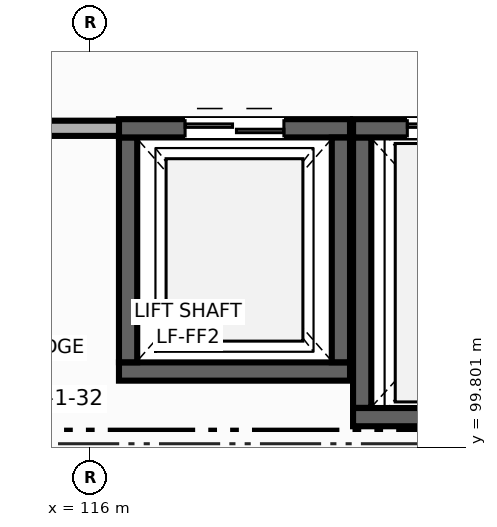
"""IFC4 building model, lengths in metres.
Left out: names, types, materials, properties, quantities, classifications, styles, units other than length and angle.
Written with IfcOpenShell. Run it as: python <this file> out.ifc"""

import sys

from ifc_helpers import new_model, si_unit, direction, frame, frame_2d, origin, place, context, subcontext, project, spatial, rectangle, extrude, element, fill, save


model = new_model("IFC4")
c1 = context("Model", 3, precision=1e-05, world=origin(), true_north=direction((0.0, 1.0)))
c2 = subcontext(c1, "Body", "Model", "MODEL_VIEW")
j1 = project(units=[si_unit("LENGTHUNIT", "METRE"), si_unit("PLANEANGLEUNIT", "RADIAN")], contexts=[c1])
p1 = place(None, origin())
s1 = spatial("IfcSite", under=j1, at=p1, CompositionType="ELEMENT")
p2 = place(p1, origin())
s2 = spatial("IfcBuilding", under=s1, at=p2, CompositionType="ELEMENT")
p3 = place(p2, frame((0.0, 0.0, 18.9)))
s3 = spatial("IfcBuildingStorey", under=s2, at=p3, CompositionType="ELEMENT", Elevation=18.9)
p4 = place(p3, frame((119.42, 100.8, 0.0), z_axis=(0.0, 0.0, 1.0), x_axis=(-1.0, 0.0, 0.0)))
e1 = element("IfcWall", 1, at=p4, inside=s3, PredefinedType="SHEAR", context=c2, shape_type="SweptSolid", body=[
    extrude(rectangle(XDim=3.04, YDim=0.24, at=frame_2d((1.52, 0.0))), origin(), (0.0, 0.0, 1.0), 3.98),
])
p5 = place(p3, frame((116.5, 100.922, 0.0), z_axis=(0.0, 0.0, 1.0), x_axis=(0.0, 1.0, 0.0)))
e2 = element("IfcWall", 2, at=p5, inside=s3, PredefinedType="SHEAR", context=c2, shape_type="SweptSolid", body=[
    extrude(rectangle(XDim=2.958, YDim=0.24, at=frame_2d((1.479, 0.0))), origin(), (0.0, 0.0, 1.0), 3.98),
])
p6 = place(p3, frame((116.38, 104.0, 0.0), z_axis=(0.0, 0.0, 1.0), x_axis=(1.0, 0.0, 0.0)))
e3 = element("IfcWall", 3, at=p6, inside=s3, PredefinedType="SHEAR", context=c2, shape_type="SweptSolid", body=[
    extrude(rectangle(XDim=3.04, YDim=0.24, at=frame_2d((1.52, 0.0))), origin(), (0.0, 0.0, 1.0), 3.98),
])
p7 = place(p6, frame((0.87, 0.0, 0.0)))
e4 = element("IfcOpeningElement", 4, at=p7, cuts=e3, PredefinedType="OPENING", context=c2, shape_type="SweptSolid", body=[
    extrude(rectangle(XDim=1.3, YDim=2.15, at=frame_2d((0.65, 1.075))), frame((0.0, 0.13, 0.0), z_axis=(0.0, -1.0, 0.0), x_axis=(1.0, 0.0, 0.0)), (0.0, 0.0, 1.0), 0.26),
])
p8 = place(p3, frame((119.3, 103.878, 0.0), z_axis=(0.0, 0.0, 1.0), x_axis=(0.0, -1.0, 0.0)))
e5 = element("IfcWall", 5, at=p8, inside=s3, PredefinedType="SHEAR", context=c2, shape_type="SweptSolid", body=[
    extrude(rectangle(XDim=2.956, YDim=0.24, at=frame_2d((1.478, 0.0))), origin(), (0.0, 0.0, 1.0), 3.98),
])
p9 = place(p3, frame((123.088, 100.2, 0.0), z_axis=(0.0, 0.0, 1.0), x_axis=(-1.0, 0.0, 0.0)))
e6 = element("IfcWall", 6, at=p9, inside=s3, PredefinedType="SHEAR", context=c2, shape_type="SweptSolid", body=[
    extrude(rectangle(XDim=3.628, YDim=0.24, at=frame_2d((1.814, 0.0))), origin(), (0.0, 0.0, 1.0), 3.98),
])
p10 = place(p3, frame((119.58, 100.322, 0.0), z_axis=(0.0, 0.0, 1.0), x_axis=(0.0, 1.0, 0.0)))
e7 = element("IfcWall", 7, at=p10, inside=s3, PredefinedType="SHEAR", context=c2, shape_type="SweptSolid", body=[
    extrude(rectangle(XDim=3.558, YDim=0.24, at=frame_2d((1.779, 0.0))), origin(), (0.0, 0.0, 1.0), 3.98),
])
p11 = place(p3, frame((119.46, 104.0, 0.0), z_axis=(0.0, 0.0, 1.0), x_axis=(1.0, 0.0, 0.0)))
e8 = element("IfcWall", 8, at=p11, inside=s3, PredefinedType="SHEAR", context=c2, shape_type="SweptSolid", body=[
    extrude(rectangle(XDim=3.628, YDim=0.24, at=frame_2d((1.814, 0.0))), origin(), (0.0, 0.0, 1.0), 3.98),
])
p12 = place(p11, frame((0.714, 0.0, 0.0)))
e9 = element("IfcOpeningElement", 9, at=p12, cuts=e8, PredefinedType="OPENING", context=c2, shape_type="SweptSolid", body=[
    extrude(rectangle(XDim=2.2, YDim=2.5, at=frame_2d((1.1, 1.25))), frame((0.0, 0.13, 0.0), z_axis=(0.0, -1.0, 0.0), x_axis=(1.0, 0.0, 0.0)), (0.0, 0.0, 1.0), 0.26),
])
p13 = place(p3, frame((116.38, 104.0, 0.0), z_axis=(0.0, 0.0, 1.0), x_axis=(-1.0, 0.0, 0.0)))
e10 = element("IfcWall", 10, at=p13, inside=s3, PredefinedType="PARTITIONING", context=c2, shape_type="SweptSolid", body=[
    extrude(rectangle(XDim=1.88, YDim=0.2, at=frame_2d((0.94, 0.0))), origin(), (0.0, 0.0, 1.0), 3.98),
])
p14 = place(p7, origin())
e11 = element("IfcDoor", 11, at=p14, inside=s3, OperationType="DOUBLE_DOOR_SLIDING", PredefinedType="DOOR", context=c2, shape_type="SweptSolid", body=[
    extrude(rectangle(XDim=1.3, YDim=2.15, at=frame_2d((0.65, 1.075))), frame((0.0, 0.025, 0.0), z_axis=(0.0, -1.0, 0.0), x_axis=(1.0, 0.0, 0.0)), (0.0, 0.0, 1.0), 0.05),
])
fill(e4, e11)
p15 = place(p12, origin())
e12 = element("IfcDoor", 12, at=p15, inside=s3, OperationType="DOUBLE_DOOR_SLIDING", PredefinedType="DOOR", context=c2, shape_type="SweptSolid", body=[
    extrude(rectangle(XDim=2.2, YDim=2.5, at=frame_2d((1.1, 1.25))), frame((0.0, 0.025, 0.0), z_axis=(0.0, -1.0, 0.0), x_axis=(1.0, 0.0, 0.0)), (0.0, 0.0, 1.0), 0.05),
])
fill(e9, e12)
save(model, sys.argv[1])
